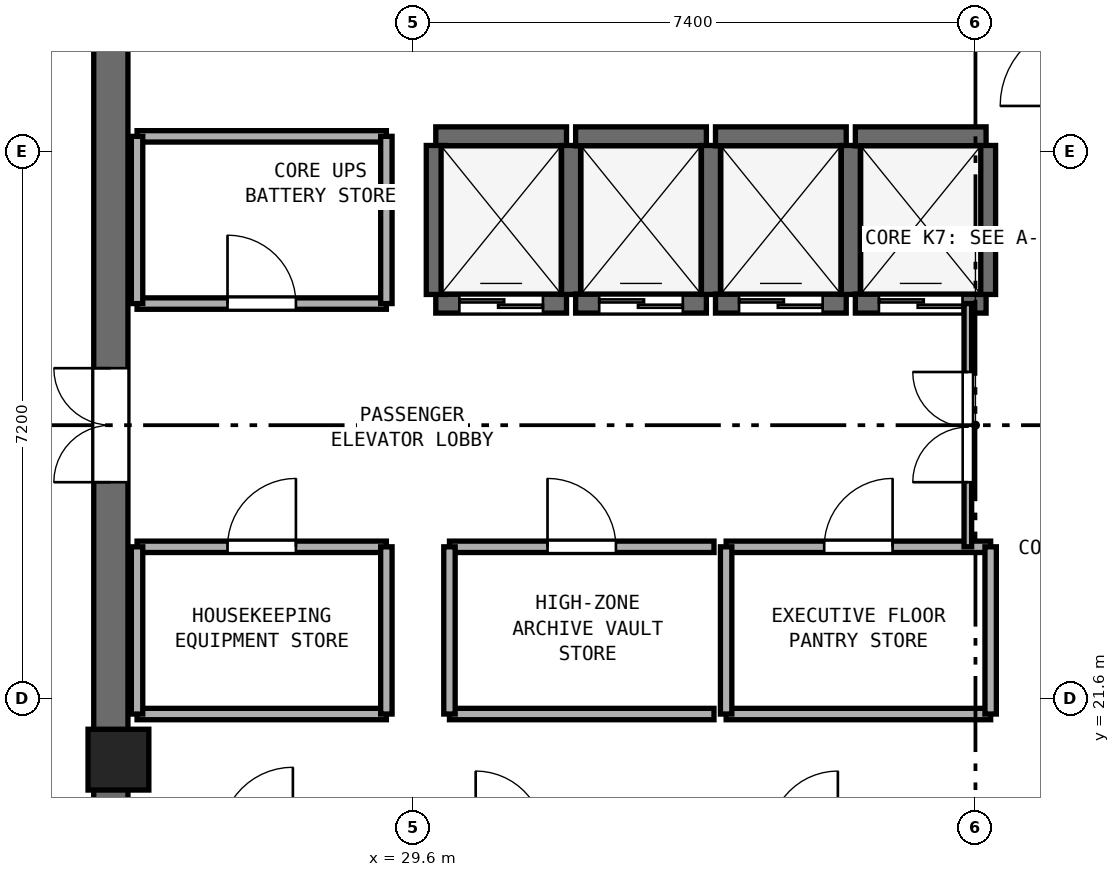
"""IFC4 building model, lengths in metres.
Left out: names, types, materials, properties, quantities, classifications, styles, units other than length and angle.
Written with IfcOpenShell. Run it as: python <this file> out.ifc"""

import sys

from ifc_helpers import new_model, si_unit, direction, frame, frame_2d, origin, origin_2d, place, context, subcontext, project, spatial, rectangle, extrude, element, fill, save


model = new_model("IFC4")
c1 = context("Model", 3, precision=1e-05, world=origin(), true_north=direction((0.0, 1.0)))
c2 = subcontext(c1, "Body", "Model", "MODEL_VIEW")
j1 = project(units=[si_unit("LENGTHUNIT", "METRE"), si_unit("PLANEANGLEUNIT", "RADIAN")], contexts=[c1])
p1 = place(None, origin())
s1 = spatial("IfcSite", under=j1, at=p1, CompositionType="ELEMENT")
p2 = place(p1, origin())
s2 = spatial("IfcBuilding", under=s1, at=p2, CompositionType="ELEMENT")
p3 = place(p2, frame((0.0, 0.0, 285.8)))
s3 = spatial("IfcBuildingStorey", under=s2, at=p3, CompositionType="ELEMENT", Elevation=285.8)
p4 = place(p3, frame((25.625, 17.45, 0.0), z_axis=(0.0, 0.0, 1.0), x_axis=(0.0, 1.0, 0.0)))
e1 = element("IfcWall", 1, at=p4, inside=s3, PredefinedType="SHEAR", context=c2, shape_type="SweptSolid", body=[
    extrude(rectangle(XDim=15.5, YDim=0.45, at=frame_2d((7.75, 0.0))), origin(), (0.0, 0.0, 1.0), 3.54),
])
p5 = place(p4, frame((7.0, 0.0, 0.0)))
e2 = element("IfcOpeningElement", 2, at=p5, cuts=e1, PredefinedType="OPENING", context=c2, shape_type="SweptSolid", body=[
    extrude(rectangle(XDim=1.5, YDim=2.15, at=frame_2d((0.75, 1.075))), frame((0.0, 0.235, 0.0), z_axis=(0.0, -1.0, 0.0), x_axis=(1.0, 0.0, 0.0)), (0.0, 0.0, 1.0), 0.47),
])
p6 = place(p3, frame((25.725, 20.8, 0.0), z_axis=(0.0, 0.0, 1.0), x_axis=(1.0, 0.0, 0.0)))
e3 = element("IfcColumn", 3, at=p6, inside=s3, PredefinedType="PILASTER", context=c2, shape_type="SweptSolid", body=[
    extrude(rectangle(XDim=0.8, YDim=0.8, at=origin_2d()), origin(), (0.0, 0.0, 1.0), 3.8),
])
p7 = place(p3, frame((29.9, 26.8, 0.0), z_axis=(0.0, 0.0, 1.0), x_axis=(1.0, 0.0, 0.0)))
e4 = element("IfcWall", 4, at=p7, inside=s3, PredefinedType="SHEAR", context=c2, shape_type="SweptSolid", body=[
    extrude(rectangle(XDim=1.72, YDim=0.25, at=frame_2d((0.86, 0.0))), origin(), (0.0, 0.0, 1.0), 3.54),
])
p8 = place(p7, frame((0.31, 0.0, 0.0)))
e5 = element("IfcOpeningElement", 5, at=p8, cuts=e4, PredefinedType="OPENING", context=c2, shape_type="SweptSolid", body=[
    extrude(rectangle(XDim=1.1, YDim=2.15, at=frame_2d((0.55, 1.075))), frame((0.0, 0.135, 0.0), z_axis=(0.0, -1.0, 0.0), x_axis=(1.0, 0.0, 0.0)), (0.0, 0.0, 1.0), 0.27),
])
p9 = place(p3, frame((29.9, 29.0, 0.0), z_axis=(0.0, 0.0, 1.0), x_axis=(1.0, 0.0, 0.0)))
e6 = element("IfcWall", 6, at=p9, inside=s3, PredefinedType="SHEAR", context=c2, shape_type="SweptSolid", body=[
    extrude(rectangle(XDim=1.72, YDim=0.25, at=frame_2d((0.86, 0.0))), origin(), (0.0, 0.0, 1.0), 3.54),
])
for number, where, z_axis, x_axis in (
    (7, (29.9, 26.92, 0.0), (0.0, 0.0, 1.0), (0.0, 1.0, 0.0)),
    (8, (31.68, 26.92, 0.0), (0.0, 0.0, 1.0), (0.0, 1.0, 0.0)),
):
    element("IfcWall", number, at=place(p3, frame(where, z_axis=z_axis, x_axis=x_axis)), inside=s3, PredefinedType="SHEAR", context=c2, shape_type="SweptSolid", body=[
        extrude(rectangle(XDim=1.96, YDim=0.25, at=frame_2d((0.98, 0.0))), origin(), (0.0, 0.0, 1.0), 3.54),
    ])
p10 = place(p3, frame((31.74, 26.8, 0.0), z_axis=(0.0, 0.0, 1.0), x_axis=(1.0, 0.0, 0.0)))
e9 = element("IfcWall", 9, at=p10, inside=s3, PredefinedType="SHEAR", context=c2, shape_type="SweptSolid", body=[
    extrude(rectangle(XDim=1.72, YDim=0.25, at=frame_2d((0.86, 0.0))), origin(), (0.0, 0.0, 1.0), 3.54),
])
p11 = place(p10, frame((0.31, 0.0, 0.0)))
e10 = element("IfcOpeningElement", 10, at=p11, cuts=e9, PredefinedType="OPENING", context=c2, shape_type="SweptSolid", body=[
    extrude(rectangle(XDim=1.1, YDim=2.15, at=frame_2d((0.55, 1.075))), frame((0.0, 0.135, 0.0), z_axis=(0.0, -1.0, 0.0), x_axis=(1.0, 0.0, 0.0)), (0.0, 0.0, 1.0), 0.27),
])
p12 = place(p3, frame((31.74, 29.0, 0.0), z_axis=(0.0, 0.0, 1.0), x_axis=(1.0, 0.0, 0.0)))
e11 = element("IfcWall", 11, at=p12, inside=s3, PredefinedType="SHEAR", context=c2, shape_type="SweptSolid", body=[
    extrude(rectangle(XDim=1.72, YDim=0.25, at=frame_2d((0.86, 0.0))), origin(), (0.0, 0.0, 1.0), 3.54),
])
p13 = place(p3, frame((33.52, 26.92, 0.0), z_axis=(0.0, 0.0, 1.0), x_axis=(0.0, 1.0, 0.0)))
e12 = element("IfcWall", 12, at=p13, inside=s3, PredefinedType="SHEAR", context=c2, shape_type="SweptSolid", body=[
    extrude(rectangle(XDim=1.96, YDim=0.25, at=frame_2d((0.98, 0.0))), origin(), (0.0, 0.0, 1.0), 3.54),
])
p14 = place(p3, frame((33.58, 26.8, 0.0), z_axis=(0.0, 0.0, 1.0), x_axis=(1.0, 0.0, 0.0)))
e13 = element("IfcWall", 13, at=p14, inside=s3, PredefinedType="SHEAR", context=c2, shape_type="SweptSolid", body=[
    extrude(rectangle(XDim=1.72, YDim=0.25, at=frame_2d((0.86, 0.0))), origin(), (0.0, 0.0, 1.0), 3.54),
])
p15 = place(p14, frame((0.31, 0.0, 0.0)))
e14 = element("IfcOpeningElement", 14, at=p15, cuts=e13, PredefinedType="OPENING", context=c2, shape_type="SweptSolid", body=[
    extrude(rectangle(XDim=1.1, YDim=2.15, at=frame_2d((0.55, 1.075))), frame((0.0, 0.135, 0.0), z_axis=(0.0, -1.0, 0.0), x_axis=(1.0, 0.0, 0.0)), (0.0, 0.0, 1.0), 0.27),
])
p16 = place(p3, frame((33.58, 29.0, 0.0), z_axis=(0.0, 0.0, 1.0), x_axis=(1.0, 0.0, 0.0)))
e15 = element("IfcWall", 15, at=p16, inside=s3, PredefinedType="SHEAR", context=c2, shape_type="SweptSolid", body=[
    extrude(rectangle(XDim=1.72, YDim=0.25, at=frame_2d((0.86, 0.0))), origin(), (0.0, 0.0, 1.0), 3.54),
])
p17 = place(p3, frame((35.36, 26.92, 0.0), z_axis=(0.0, 0.0, 1.0), x_axis=(0.0, 1.0, 0.0)))
e16 = element("IfcWall", 16, at=p17, inside=s3, PredefinedType="SHEAR", context=c2, shape_type="SweptSolid", body=[
    extrude(rectangle(XDim=1.96, YDim=0.25, at=frame_2d((0.98, 0.0))), origin(), (0.0, 0.0, 1.0), 3.54),
])
p18 = place(p3, frame((35.42, 26.8, 0.0), z_axis=(0.0, 0.0, 1.0), x_axis=(1.0, 0.0, 0.0)))
e17 = element("IfcWall", 17, at=p18, inside=s3, PredefinedType="SHEAR", context=c2, shape_type="SweptSolid", body=[
    extrude(rectangle(XDim=1.72, YDim=0.25, at=frame_2d((0.86, 0.0))), origin(), (0.0, 0.0, 1.0), 3.54),
])
p19 = place(p18, frame((0.31, 0.0, 0.0)))
e18 = element("IfcOpeningElement", 18, at=p19, cuts=e17, PredefinedType="OPENING", context=c2, shape_type="SweptSolid", body=[
    extrude(rectangle(XDim=1.1, YDim=2.15, at=frame_2d((0.55, 1.075))), frame((0.0, 0.135, 0.0), z_axis=(0.0, -1.0, 0.0), x_axis=(1.0, 0.0, 0.0)), (0.0, 0.0, 1.0), 0.27),
])
p20 = place(p3, frame((35.42, 29.0, 0.0), z_axis=(0.0, 0.0, 1.0), x_axis=(1.0, 0.0, 0.0)))
e19 = element("IfcWall", 19, at=p20, inside=s3, PredefinedType="SHEAR", context=c2, shape_type="SweptSolid", body=[
    extrude(rectangle(XDim=1.72, YDim=0.25, at=frame_2d((0.86, 0.0))), origin(), (0.0, 0.0, 1.0), 3.54),
])
p21 = place(p3, frame((37.14, 26.92, 0.0), z_axis=(0.0, 0.0, 1.0), x_axis=(0.0, 1.0, 0.0)))
e20 = element("IfcWall", 20, at=p21, inside=s3, PredefinedType="SHEAR", context=c2, shape_type="SweptSolid", body=[
    extrude(rectangle(XDim=1.96, YDim=0.25, at=frame_2d((0.98, 0.0))), origin(), (0.0, 0.0, 1.0), 3.54),
])
p22 = place(p3, frame((25.97, 26.8, 0.0), z_axis=(0.0, 0.0, 1.0), x_axis=(1.0, 0.0, 0.0)))
e21 = element("IfcWall", 21, at=p22, inside=s3, PredefinedType="PARTITIONING", context=c2, shape_type="SweptSolid", body=[
    extrude(rectangle(XDim=3.28, YDim=0.15, at=frame_2d((1.64, 0.0))), origin(), (0.0, 0.0, 1.0), 3.54),
])
p23 = place(p22, frame((1.19, 0.0, 0.0)))
e22 = element("IfcOpeningElement", 22, at=p23, cuts=e21, PredefinedType="OPENING", context=c2, shape_type="SweptSolid", body=[
    extrude(rectangle(XDim=0.9, YDim=2.1, at=frame_2d((0.45, 1.05))), frame((0.0, 0.085, 0.0), z_axis=(0.0, -1.0, 0.0), x_axis=(1.0, 0.0, 0.0)), (0.0, 0.0, 1.0), 0.17),
])
p24 = place(p3, frame((25.97, 29.0, 0.0), z_axis=(0.0, 0.0, 1.0), x_axis=(1.0, 0.0, 0.0)))
e23 = element("IfcWall", 23, at=p24, inside=s3, PredefinedType="PARTITIONING", context=c2, shape_type="SweptSolid", body=[
    extrude(rectangle(XDim=3.28, YDim=0.15, at=frame_2d((1.64, 0.0))), origin(), (0.0, 0.0, 1.0), 3.54),
])
p25 = place(p3, frame((25.97, 26.8, 0.0), z_axis=(0.0, 0.0, 1.0), x_axis=(0.0, 1.0, 0.0)))
e24 = element("IfcWall", 24, at=p25, inside=s3, PredefinedType="PARTITIONING", context=c2, shape_type="SweptSolid", body=[
    extrude(rectangle(XDim=2.2, YDim=0.15, at=frame_2d((1.1, 0.0))), origin(), (0.0, 0.0, 1.0), 2.64),
])
p26 = place(p3, frame((29.25, 26.8, 0.0), z_axis=(0.0, 0.0, 1.0), x_axis=(0.0, 1.0, 0.0)))
e25 = element("IfcWall", 25, at=p26, inside=s3, PredefinedType="PARTITIONING", context=c2, shape_type="SweptSolid", body=[
    extrude(rectangle(XDim=2.2, YDim=0.15, at=frame_2d((1.1, 0.0))), origin(), (0.0, 0.0, 1.0), 3.54),
])
p27 = place(p3, frame((25.97, 21.4, 0.0), z_axis=(0.0, 0.0, 1.0), x_axis=(1.0, 0.0, 0.0)))
e26 = element("IfcWall", 26, at=p27, inside=s3, PredefinedType="PARTITIONING", context=c2, shape_type="SweptSolid", body=[
    extrude(rectangle(XDim=3.28, YDim=0.15, at=frame_2d((1.64, 0.0))), origin(), (0.0, 0.0, 1.0), 3.54),
])
p28 = place(p3, frame((25.97, 23.6, 0.0), z_axis=(0.0, 0.0, 1.0), x_axis=(1.0, 0.0, 0.0)))
e27 = element("IfcWall", 27, at=p28, inside=s3, PredefinedType="PARTITIONING", context=c2, shape_type="SweptSolid", body=[
    extrude(rectangle(XDim=3.28, YDim=0.15, at=frame_2d((1.64, 0.0))), origin(), (0.0, 0.0, 1.0), 3.54),
])
p29 = place(p28, frame((1.19, 0.0, 0.0)))
e28 = element("IfcOpeningElement", 28, at=p29, cuts=e27, PredefinedType="OPENING", context=c2, shape_type="SweptSolid", body=[
    extrude(rectangle(XDim=0.9, YDim=2.1, at=frame_2d((0.45, 1.05))), frame((0.0, 0.085, 0.0), z_axis=(0.0, -1.0, 0.0), x_axis=(1.0, 0.0, 0.0)), (0.0, 0.0, 1.0), 0.17),
])
p30 = place(p3, frame((25.97, 21.4, 0.0), z_axis=(0.0, 0.0, 1.0), x_axis=(0.0, 1.0, 0.0)))
e29 = element("IfcWall", 29, at=p30, inside=s3, PredefinedType="PARTITIONING", context=c2, shape_type="SweptSolid", body=[
    extrude(rectangle(XDim=2.2, YDim=0.15, at=frame_2d((1.1, 0.0))), origin(), (0.0, 0.0, 1.0), 2.64),
])
p31 = place(p3, frame((29.25, 21.4, 0.0), z_axis=(0.0, 0.0, 1.0), x_axis=(0.0, 1.0, 0.0)))
e30 = element("IfcWall", 30, at=p31, inside=s3, PredefinedType="PARTITIONING", context=c2, shape_type="SweptSolid", body=[
    extrude(rectangle(XDim=2.2, YDim=0.15, at=frame_2d((1.1, 0.0))), origin(), (0.0, 0.0, 1.0), 3.54),
])
p32 = place(p3, frame((30.08, 21.4, 0.0), z_axis=(0.0, 0.0, 1.0), x_axis=(1.0, 0.0, 0.0)))
e31 = element("IfcWall", 31, at=p32, inside=s3, PredefinedType="PARTITIONING", context=c2, shape_type="SweptSolid", body=[
    extrude(rectangle(XDim=3.48, YDim=0.15, at=frame_2d((1.74, 0.0))), origin(), (0.0, 0.0, 1.0), 3.54),
])
p33 = place(p3, frame((30.08, 23.6, 0.0), z_axis=(0.0, 0.0, 1.0), x_axis=(1.0, 0.0, 0.0)))
e32 = element("IfcWall", 32, at=p33, inside=s3, PredefinedType="PARTITIONING", context=c2, shape_type="SweptSolid", body=[
    extrude(rectangle(XDim=3.48, YDim=0.15, at=frame_2d((1.74, 0.0))), origin(), (0.0, 0.0, 1.0), 3.54),
])
p34 = place(p33, frame((1.29, 0.0, 0.0)))
e33 = element("IfcOpeningElement", 33, at=p34, cuts=e32, PredefinedType="OPENING", context=c2, shape_type="SweptSolid", body=[
    extrude(rectangle(XDim=0.9, YDim=2.1, at=frame_2d((0.45, 1.05))), frame((0.0, 0.085, 0.0), z_axis=(0.0, -1.0, 0.0), x_axis=(1.0, 0.0, 0.0)), (0.0, 0.0, 1.0), 0.17),
])
p35 = place(p3, frame((30.08, 21.4, 0.0), z_axis=(0.0, 0.0, 1.0), x_axis=(0.0, 1.0, 0.0)))
e34 = element("IfcWall", 34, at=p35, inside=s3, PredefinedType="PARTITIONING", context=c2, shape_type="SweptSolid", body=[
    extrude(rectangle(XDim=2.2, YDim=0.15, at=frame_2d((1.1, 0.0))), origin(), (0.0, 0.0, 1.0), 3.54),
])
p36 = place(p3, frame((33.72, 21.4, 0.0), z_axis=(0.0, 0.0, 1.0), x_axis=(1.0, 0.0, 0.0)))
e35 = element("IfcWall", 35, at=p36, inside=s3, PredefinedType="PARTITIONING", context=c2, shape_type="SweptSolid", body=[
    extrude(rectangle(XDim=3.48, YDim=0.15, at=frame_2d((1.74, 0.0))), origin(), (0.0, 0.0, 1.0), 3.54),
])
p37 = place(p3, frame((33.72, 23.6, 0.0), z_axis=(0.0, 0.0, 1.0), x_axis=(1.0, 0.0, 0.0)))
e36 = element("IfcWall", 36, at=p37, inside=s3, PredefinedType="PARTITIONING", context=c2, shape_type="SweptSolid", body=[
    extrude(rectangle(XDim=3.48, YDim=0.15, at=frame_2d((1.74, 0.0))), origin(), (0.0, 0.0, 1.0), 3.54),
])
p38 = place(p37, frame((1.29, 0.0, 0.0)))
e37 = element("IfcOpeningElement", 37, at=p38, cuts=e36, PredefinedType="OPENING", context=c2, shape_type="SweptSolid", body=[
    extrude(rectangle(XDim=0.9, YDim=2.1, at=frame_2d((0.45, 1.05))), frame((0.0, 0.085, 0.0), z_axis=(0.0, -1.0, 0.0), x_axis=(1.0, 0.0, 0.0)), (0.0, 0.0, 1.0), 0.17),
])
for number, where, z_axis, x_axis in (
    (38, (33.72, 21.4, 0.0), (0.0, 0.0, 1.0), (0.0, 1.0, 0.0)),
    (39, (37.2, 21.4, 0.0), (0.0, 0.0, 1.0), (0.0, 1.0, 0.0)),
):
    element("IfcWall", number, at=place(p3, frame(where, z_axis=z_axis, x_axis=x_axis)), inside=s3, PredefinedType="PARTITIONING", context=c2, shape_type="SweptSolid", body=[
        extrude(rectangle(XDim=2.2, YDim=0.15, at=frame_2d((1.1, 0.0))), origin(), (0.0, 0.0, 1.0), 3.54),
    ])
p39 = place(p3, frame((36.9, 23.6, 0.0), z_axis=(0.0, 0.0, 1.0), x_axis=(0.0, 1.0, 0.0)))
e40 = element("IfcWall", 40, at=p39, inside=s3, PredefinedType="PARTITIONING", context=c2, shape_type="SweptSolid", body=[
    extrude(rectangle(XDim=3.2, YDim=0.1, at=frame_2d((1.6, 0.0))), origin(), (0.0, 0.0, 1.0), 3.54),
])
p40 = place(p39, frame((0.85, 0.0, 0.0)))
e41 = element("IfcOpeningElement", 41, at=p40, cuts=e40, PredefinedType="OPENING", context=c2, shape_type="SweptSolid", body=[
    extrude(rectangle(XDim=1.45, YDim=2.12, at=frame_2d((0.725, 1.06))), frame((0.0, 0.06, 0.0), z_axis=(0.0, -1.0, 0.0), x_axis=(1.0, 0.0, 0.0)), (0.0, 0.0, 1.0), 0.12),
])
p41 = place(p8, origin())
e42 = element("IfcDoor", 42, at=p41, inside=s3, OperationType="DOUBLE_DOOR_SLIDING", PredefinedType="DOOR", context=c2, shape_type="SweptSolid", body=[
    extrude(rectangle(XDim=1.1, YDim=2.15, at=frame_2d((0.55, 1.075))), frame((0.0, 0.025, 0.0), z_axis=(0.0, -1.0, 0.0), x_axis=(1.0, 0.0, 0.0)), (0.0, 0.0, 1.0), 0.05),
])
fill(e5, e42)
p42 = place(p11, origin())
e43 = element("IfcDoor", 43, at=p42, inside=s3, OperationType="DOUBLE_DOOR_SLIDING", PredefinedType="DOOR", context=c2, shape_type="SweptSolid", body=[
    extrude(rectangle(XDim=1.1, YDim=2.15, at=frame_2d((0.55, 1.075))), frame((0.0, 0.025, 0.0), z_axis=(0.0, -1.0, 0.0), x_axis=(1.0, 0.0, 0.0)), (0.0, 0.0, 1.0), 0.05),
])
fill(e10, e43)
p43 = place(p15, origin())
e44 = element("IfcDoor", 44, at=p43, inside=s3, OperationType="DOUBLE_DOOR_SLIDING", PredefinedType="DOOR", context=c2, shape_type="SweptSolid", body=[
    extrude(rectangle(XDim=1.1, YDim=2.15, at=frame_2d((0.55, 1.075))), frame((0.0, 0.025, 0.0), z_axis=(0.0, -1.0, 0.0), x_axis=(1.0, 0.0, 0.0)), (0.0, 0.0, 1.0), 0.05),
])
fill(e14, e44)
p44 = place(p19, origin())
e45 = element("IfcDoor", 45, at=p44, inside=s3, OperationType="DOUBLE_DOOR_SLIDING", PredefinedType="DOOR", context=c2, shape_type="SweptSolid", body=[
    extrude(rectangle(XDim=1.1, YDim=2.15, at=frame_2d((0.55, 1.075))), frame((0.0, 0.025, 0.0), z_axis=(0.0, -1.0, 0.0), x_axis=(1.0, 0.0, 0.0)), (0.0, 0.0, 1.0), 0.05),
])
fill(e18, e45)
p45 = place(p5, origin())
e46 = element("IfcDoor", 46, at=p45, inside=s3, OperationType="DOUBLE_DOOR_SINGLE_SWING", PredefinedType="DOOR", context=c2, shape_type="SweptSolid", body=[
    extrude(rectangle(XDim=1.5, YDim=2.15, at=frame_2d((0.75, 1.075))), frame((0.0, 0.025, 0.0), z_axis=(0.0, -1.0, 0.0), x_axis=(1.0, 0.0, 0.0)), (0.0, 0.0, 1.0), 0.05),
])
fill(e2, e46)
p46 = place(p23, origin())
e47 = element("IfcDoor", 47, at=p46, inside=s3, OperationType="SINGLE_SWING_LEFT", PredefinedType="DOOR", context=c2, shape_type="SweptSolid", body=[
    extrude(rectangle(XDim=0.9, YDim=2.1, at=frame_2d((0.45, 1.05))), frame((0.0, 0.025, 0.0), z_axis=(0.0, -1.0, 0.0), x_axis=(1.0, 0.0, 0.0)), (0.0, 0.0, 1.0), 0.05),
])
fill(e22, e47)
p47 = place(p29, origin())
e48 = element("IfcDoor", 48, at=p47, inside=s3, OperationType="SINGLE_SWING_RIGHT", PredefinedType="DOOR", context=c2, shape_type="SweptSolid", body=[
    extrude(rectangle(XDim=0.9, YDim=2.1, at=frame_2d((0.45, 1.05))), frame((0.0, 0.025, 0.0), z_axis=(0.0, -1.0, 0.0), x_axis=(1.0, 0.0, 0.0)), (0.0, 0.0, 1.0), 0.05),
])
fill(e28, e48)
p48 = place(p34, origin())
e49 = element("IfcDoor", 49, at=p48, inside=s3, OperationType="SINGLE_SWING_LEFT", PredefinedType="DOOR", context=c2, shape_type="SweptSolid", body=[
    extrude(rectangle(XDim=0.9, YDim=2.1, at=frame_2d((0.45, 1.05))), frame((0.0, 0.025, 0.0), z_axis=(0.0, -1.0, 0.0), x_axis=(1.0, 0.0, 0.0)), (0.0, 0.0, 1.0), 0.05),
])
fill(e33, e49)
p49 = place(p38, origin())
e50 = element("IfcDoor", 50, at=p49, inside=s3, OperationType="SINGLE_SWING_RIGHT", PredefinedType="DOOR", context=c2, shape_type="SweptSolid", body=[
    extrude(rectangle(XDim=0.9, YDim=2.1, at=frame_2d((0.45, 1.05))), frame((0.0, 0.025, 0.0), z_axis=(0.0, -1.0, 0.0), x_axis=(1.0, 0.0, 0.0)), (0.0, 0.0, 1.0), 0.05),
])
fill(e37, e50)
p50 = place(p40, origin())
e51 = element("IfcDoor", 51, at=p50, inside=s3, OperationType="DOUBLE_DOOR_SINGLE_SWING", PredefinedType="DOOR", context=c2, shape_type="SweptSolid", body=[
    extrude(rectangle(XDim=1.45, YDim=2.12, at=frame_2d((0.725, 1.06))), frame((0.0, 0.025, 0.0), z_axis=(0.0, -1.0, 0.0), x_axis=(1.0, 0.0, 0.0)), (0.0, 0.0, 1.0), 0.05),
])
fill(e41, e51)
save(model, sys.argv[1])
